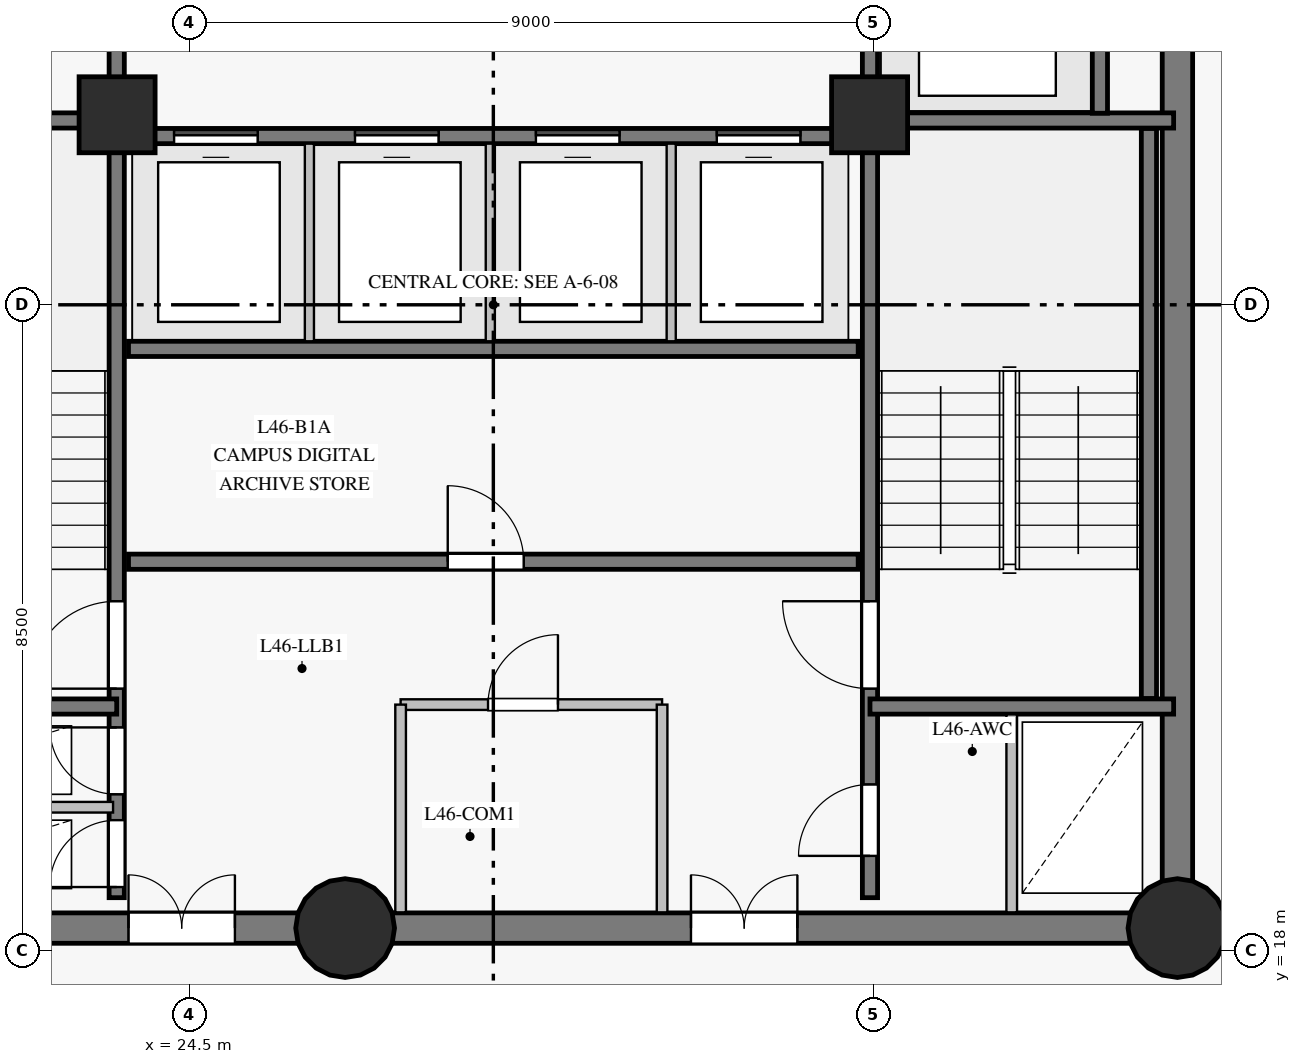
"""IFC4 building model, lengths in metres.
Left out: names, types, materials, properties, quantities, classifications, styles, units other than length and angle.
Written with IfcOpenShell. Run it as: python <this file> out.ifc"""

import sys

from ifc_helpers import new_model, si_unit, direction, frame, frame_2d, origin, origin_with_axes, origin_2d, place, context, subcontext, project, spatial, rectangle, circle, extrude, source, transform, mapped, element, fill, save


model = new_model("IFC4")
c1 = context("Model", 3, precision=1e-05, world=origin(), true_north=direction((0.0, 1.0)))
c2 = subcontext(c1, "Body", "Model", "MODEL_VIEW")
j1 = project(units=[si_unit("LENGTHUNIT", "METRE"), si_unit("PLANEANGLEUNIT", "RADIAN")], contexts=[c1])
p1 = place(None, origin())
s1 = spatial("IfcSite", under=j1, at=p1, CompositionType="ELEMENT")
p2 = place(p1, origin())
s2 = spatial("IfcBuilding", under=s1, at=p2, CompositionType="ELEMENT")
p3 = place(p2, frame((0.0, 0.0, 162.65)))
s3 = spatial("IfcBuildingStorey", under=s2, at=p3, CompositionType="ELEMENT", Elevation=162.65)
p4 = place(p3, frame((19.5, 18.3, 0.0), z_axis=(0.0, 0.0, 1.0), x_axis=(1.0, 0.0, 0.0)))
e1 = element("IfcWall", 1, at=p4, inside=s3, PredefinedType="SHEAR", context=c2, shape_type="SweptSolid", body=[
    extrude(rectangle(XDim=7.05, YDim=0.4, at=frame_2d((3.525, 0.0))), origin(), (0.0, 0.0, 1.0), 2.825),
])
p5 = place(p4, frame((4.2, 0.0, 0.0)))
e2 = element("IfcOpeningElement", 2, at=p5, cuts=e1, PredefinedType="OPENING", context=c2, shape_type="SweptSolid", body=[
    extrude(rectangle(XDim=1.4, YDim=2.2, at=frame_2d((0.7, 1.1))), frame((0.0, 0.21, 0.0), z_axis=(0.0, -1.0, 0.0), x_axis=(1.0, 0.0, 0.0)), (0.0, 0.0, 1.0), 0.42),
])
p6 = place(p3, frame((26.55, 18.3, 0.0), z_axis=(0.0, 0.0, 1.0), x_axis=(1.0, 0.0, 0.0)))
e3 = element("IfcWall", 3, at=p6, inside=s3, PredefinedType="SHEAR", context=c2, shape_type="SweptSolid", body=[
    extrude(rectangle(XDim=10.95, YDim=0.4, at=frame_2d((5.475, 0.0))), origin(), (0.0, 0.0, 1.0), 2.825),
])
p7 = place(p6, frame((4.55, 0.0, 0.0)))
e4 = element("IfcOpeningElement", 4, at=p7, cuts=e3, PredefinedType="OPENING", context=c2, shape_type="SweptSolid", body=[
    extrude(rectangle(XDim=1.4, YDim=2.2, at=frame_2d((0.7, 1.1))), frame((0.0, 0.21, 0.0), z_axis=(0.0, -1.0, 0.0), x_axis=(1.0, 0.0, 0.0)), (0.0, 0.0, 1.0), 0.42),
])
p8 = place(p3, frame((37.5, 18.3, 0.0), z_axis=(0.0, 0.0, 1.0), x_axis=(0.0, 1.0, 0.0)))
e5 = element("IfcWall", 5, at=p8, inside=s3, PredefinedType="SHEAR", context=c2, shape_type="SweptSolid", body=[
    extrude(rectangle(XDim=16.4, YDim=0.4, at=frame_2d((8.2, 0.0))), origin(), (0.0, 0.0, 1.0), 2.825),
])
p9 = place(p8, frame((14.15, 0.0, 0.0)))
e6 = element("IfcOpeningElement", 6, at=p9, cuts=e5, PredefinedType="OPENING", context=c2, shape_type="SweptSolid", body=[
    extrude(rectangle(XDim=1.2, YDim=2.15, at=frame_2d((0.6, 1.075))), frame((0.0, 0.21, 0.0), z_axis=(0.0, -1.0, 0.0), x_axis=(1.0, 0.0, 0.0)), (0.0, 0.0, 1.0), 0.42),
])
m1 = source(origin_with_axes(), c2, "Body", "SweptSolid", [
    extrude(circle(Radius=0.65, at=origin_2d()), origin(), (0.0, 0.0, 1.0), 3.05),
])
for number, where, z_axis, x_axis in (
    (7, (26.55, 18.3, 0.0), (0.0, 0.0, 1.0), (1.0, 0.0, 0.0)),
    (8, (37.5, 18.3, 0.0), (0.0, 0.0, 1.0), (1.0, 0.0, 0.0)),
):
    element("IfcColumn", number, at=place(p3, frame(where, z_axis=z_axis, x_axis=x_axis)), inside=s3, PredefinedType="COLUMN", context=c2, shape_type="MappedRepresentation", body=[
        mapped(m1, transform((0.0, 0.0, 0.0), scale=1.0)),
    ])
m2 = source(origin_with_axes(), c2, "Body", "SweptSolid", [
    extrude(rectangle(XDim=1.0, YDim=1.0, at=origin_2d()), origin(), (0.0, 0.0, 1.0), 3.05),
])
for number, where, z_axis, x_axis in (
    (9, (23.55, 29.0, 0.0), (0.0, 0.0, 1.0), (1.0, 0.0, 0.0)),
    (10, (33.45, 29.0, 0.0), (0.0, 0.0, 1.0), (1.0, 0.0, 0.0)),
):
    element("IfcColumn", number, at=place(p3, frame(where, z_axis=z_axis, x_axis=x_axis)), inside=s3, PredefinedType="COLUMN", context=c2, shape_type="MappedRepresentation", body=[
        mapped(m2, transform((0.0, 0.0, 0.0), scale=1.0)),
    ])
p10 = place(p3, frame((23.545, 18.7, 0.0), z_axis=(0.0, 0.0, 1.0), x_axis=(0.0, 1.0, 0.0)))
e11 = element("IfcWall", 11, at=p10, inside=s3, PredefinedType="SHEAR", context=c2, shape_type="SweptSolid", body=[
    extrude(rectangle(XDim=15.6, YDim=0.2, at=frame_2d((7.8, 0.0))), origin(), (0.0, 0.0, 1.0), 2.825),
])
p11 = place(p10, frame((2.75, 0.0, 0.0)))
e12 = element("IfcOpeningElement", 12, at=p11, cuts=e11, PredefinedType="OPENING", context=c2, shape_type="SweptSolid", body=[
    extrude(rectangle(XDim=1.15, YDim=2.15, at=frame_2d((0.575, 1.075))), frame((0.0, 0.11, 0.0), z_axis=(0.0, -1.0, 0.0), x_axis=(1.0, 0.0, 0.0)), (0.0, 0.0, 1.0), 0.22),
])
p12 = place(p10, frame((0.14, 0.0, 0.0)))
e13 = element("IfcOpeningElement", 13, at=p12, cuts=e11, PredefinedType="OPENING", context=c2, shape_type="SweptSolid", body=[
    extrude(rectangle(XDim=0.88, YDim=2.1, at=frame_2d((0.44, 1.05))), frame((0.0, 0.11, 0.0), z_axis=(0.0, -1.0, 0.0), x_axis=(1.0, 0.0, 0.0)), (0.0, 0.0, 1.0), 0.22),
])
p13 = place(p10, frame((1.36, 0.0, 0.0)))
e14 = element("IfcOpeningElement", 14, at=p13, cuts=e11, PredefinedType="OPENING", context=c2, shape_type="SweptSolid", body=[
    extrude(rectangle(XDim=0.88, YDim=2.1, at=frame_2d((0.44, 1.05))), frame((0.0, 0.11, 0.0), z_axis=(0.0, -1.0, 0.0), x_axis=(1.0, 0.0, 0.0)), (0.0, 0.0, 1.0), 0.22),
])
p14 = place(p10, frame((12.1, 0.0, 0.0)))
e15 = element("IfcOpeningElement", 15, at=p14, cuts=e11, PredefinedType="OPENING", context=c2, shape_type="SweptSolid", body=[
    extrude(rectangle(XDim=1.12, YDim=2.15, at=frame_2d((0.56, 1.075))), frame((0.0, 0.11, 0.0), z_axis=(0.0, -1.0, 0.0), x_axis=(1.0, 0.0, 0.0)), (0.0, 0.0, 1.0), 0.22),
])
p15 = place(p10, frame((14.05, 0.0, 0.0)))
e16 = element("IfcOpeningElement", 16, at=p15, cuts=e11, PredefinedType="OPENING", context=c2, shape_type="SweptSolid", body=[
    extrude(rectangle(XDim=1.12, YDim=2.15, at=frame_2d((0.56, 1.075))), frame((0.0, 0.11, 0.0), z_axis=(0.0, -1.0, 0.0), x_axis=(1.0, 0.0, 0.0)), (0.0, 0.0, 1.0), 0.22),
])
p16 = place(p3, frame((33.455, 18.7, 0.0), z_axis=(0.0, 0.0, 1.0), x_axis=(0.0, 1.0, 0.0)))
e17 = element("IfcWall", 17, at=p16, inside=s3, PredefinedType="SHEAR", context=c2, shape_type="SweptSolid", body=[
    extrude(rectangle(XDim=15.6, YDim=0.2, at=frame_2d((7.8, 0.0))), origin(), (0.0, 0.0, 1.0), 2.825),
])
p17 = place(p16, frame((2.75, 0.0, 0.0)))
e18 = element("IfcOpeningElement", 18, at=p17, cuts=e17, PredefinedType="OPENING", context=c2, shape_type="SweptSolid", body=[
    extrude(rectangle(XDim=1.15, YDim=2.15, at=frame_2d((0.575, 1.075))), frame((0.0, 0.11, 0.0), z_axis=(0.0, -1.0, 0.0), x_axis=(1.0, 0.0, 0.0)), (0.0, 0.0, 1.0), 0.22),
])
p18 = place(p16, frame((0.55, 0.0, 0.0)))
e19 = element("IfcOpeningElement", 19, at=p18, cuts=e17, PredefinedType="OPENING", context=c2, shape_type="SweptSolid", body=[
    extrude(rectangle(XDim=0.94, YDim=2.1, at=frame_2d((0.47, 1.05))), frame((0.0, 0.11, 0.0), z_axis=(0.0, -1.0, 0.0), x_axis=(1.0, 0.0, 0.0)), (0.0, 0.0, 1.0), 0.22),
])
p19 = place(p3, frame((23.7, 23.12, 0.0), z_axis=(0.0, 0.0, 1.0), x_axis=(1.0, 0.0, 0.0)))
e20 = element("IfcWall", 20, at=p19, inside=s3, PredefinedType="SHEAR", context=c2, shape_type="SweptSolid", body=[
    extrude(rectangle(XDim=9.6, YDim=0.2, at=frame_2d((4.8, 0.0))), origin(), (0.0, 0.0, 1.0), 2.825),
])
p20 = place(p19, frame((4.2, 0.0, 0.0)))
e21 = element("IfcOpeningElement", 21, at=p20, cuts=e20, PredefinedType="OPENING", context=c2, shape_type="SweptSolid", body=[
    extrude(rectangle(XDim=1.0, YDim=2.15, at=frame_2d((0.5, 1.075))), frame((0.0, 0.11, 0.0), z_axis=(0.0, -1.0, 0.0), x_axis=(1.0, 0.0, 0.0)), (0.0, 0.0, 1.0), 0.22),
])
p21 = place(p3, frame((23.7, 25.92, 0.0), z_axis=(0.0, 0.0, 1.0), x_axis=(1.0, 0.0, 0.0)))
e22 = element("IfcWall", 22, at=p21, inside=s3, PredefinedType="SHEAR", context=c2, shape_type="SweptSolid", body=[
    extrude(rectangle(XDim=9.6, YDim=0.2, at=frame_2d((4.8, 0.0))), origin(), (0.0, 0.0, 1.0), 2.825),
])
p22 = place(p3, frame((23.7, 28.72, 0.0), z_axis=(0.0, 0.0, 1.0), x_axis=(1.0, 0.0, 0.0)))
e23 = element("IfcWall", 23, at=p22, inside=s3, PredefinedType="SHEAR", context=c2, shape_type="SweptSolid", body=[
    extrude(rectangle(XDim=9.6, YDim=0.2, at=frame_2d((4.8, 0.0))), origin(), (0.0, 0.0, 1.0), 2.825),
])
p23 = place(p22, frame((0.6, 0.0, 0.0)))
e24 = element("IfcOpeningElement", 24, at=p23, cuts=e23, PredefinedType="OPENING", context=c2, shape_type="SweptSolid", body=[
    extrude(rectangle(XDim=1.1, YDim=2.15, at=frame_2d((0.55, 1.075))), frame((0.0, 0.11, 0.0), z_axis=(0.0, -1.0, 0.0), x_axis=(1.0, 0.0, 0.0)), (0.0, 0.0, 1.0), 0.22),
])
p24 = place(p22, frame((2.98, 0.0, 0.0)))
e25 = element("IfcOpeningElement", 25, at=p24, cuts=e23, PredefinedType="OPENING", context=c2, shape_type="SweptSolid", body=[
    extrude(rectangle(XDim=1.1, YDim=2.15, at=frame_2d((0.55, 1.075))), frame((0.0, 0.11, 0.0), z_axis=(0.0, -1.0, 0.0), x_axis=(1.0, 0.0, 0.0)), (0.0, 0.0, 1.0), 0.22),
])
p25 = place(p22, frame((5.36, 0.0, 0.0)))
e26 = element("IfcOpeningElement", 26, at=p25, cuts=e23, PredefinedType="OPENING", context=c2, shape_type="SweptSolid", body=[
    extrude(rectangle(XDim=1.1, YDim=2.15, at=frame_2d((0.55, 1.075))), frame((0.0, 0.11, 0.0), z_axis=(0.0, -1.0, 0.0), x_axis=(1.0, 0.0, 0.0)), (0.0, 0.0, 1.0), 0.22),
])
p26 = place(p22, frame((7.74, 0.0, 0.0)))
e27 = element("IfcOpeningElement", 27, at=p26, cuts=e23, PredefinedType="OPENING", context=c2, shape_type="SweptSolid", body=[
    extrude(rectangle(XDim=1.1, YDim=2.15, at=frame_2d((0.55, 1.075))), frame((0.0, 0.11, 0.0), z_axis=(0.0, -1.0, 0.0), x_axis=(1.0, 0.0, 0.0)), (0.0, 0.0, 1.0), 0.22),
])
p27 = place(p3, frame((37.125, 21.32, 0.0), z_axis=(0.0, 0.0, 1.0), x_axis=(0.0, 1.0, 0.0)))
e28 = element("IfcWall", 28, at=p27, inside=s3, PredefinedType="SHEAR", context=c2, shape_type="SweptSolid", body=[
    extrude(rectangle(XDim=7.5, YDim=0.2, at=frame_2d((3.75, 0.0))), origin(), (0.0, 0.0, 1.0), 2.825),
])
for number, where, z_axis, x_axis in (
    (29, (33.455, 21.215, 0.0), (0.0, 0.0, 1.0), (1.0, 0.0, 0.0)),
    (30, (33.455, 28.925, 0.0), (0.0, 0.0, 1.0), (1.0, 0.0, 0.0)),
    (31, (19.55, 21.215, 0.0), (0.0, 0.0, 1.0), (1.0, 0.0, 0.0)),
    (32, (19.55, 28.925, 0.0), (0.0, 0.0, 1.0), (1.0, 0.0, 0.0)),
):
    element("IfcWall", number, at=place(p3, frame(where, z_axis=z_axis, x_axis=x_axis)), inside=s3, PredefinedType="SHEAR", context=c2, shape_type="SweptSolid", body=[
        extrude(rectangle(XDim=3.995, YDim=0.2, at=frame_2d((1.998, 0.0))), origin(), (0.0, 0.0, 1.0), 2.825),
    ])
p28 = place(p3, frame((36.48, 29.02, 0.0), z_axis=(0.0, 0.0, 1.0), x_axis=(0.0, 1.0, 0.0)))
e33 = element("IfcWall", 33, at=p28, inside=s3, PredefinedType="SHEAR", context=c2, shape_type="SweptSolid", body=[
    extrude(rectangle(XDim=2.86, YDim=0.2, at=frame_2d((1.43, 0.0))), origin(), (0.0, 0.0, 1.0), 2.825),
])
p29 = place(p3, frame((19.707, 19.89, 0.0), z_axis=(0.0, 0.0, 1.0), x_axis=(1.0, 0.0, 0.0)))
e34 = element("IfcWall", 34, at=p29, inside=s3, PredefinedType="PARTITIONING", context=c2, shape_type="SweptSolid", body=[
    extrude(rectangle(XDim=3.79, YDim=0.14, at=frame_2d((1.895, 0.0))), origin(), (0.0, 0.0, 1.0), 2.825),
])
p30 = place(p3, frame((27.28, 21.24, 0.0), z_axis=(0.0, 0.0, 1.0), x_axis=(1.0, 0.0, 0.0)))
e35 = element("IfcWall", 35, at=p30, inside=s3, PredefinedType="PARTITIONING", context=c2, shape_type="SweptSolid", body=[
    extrude(rectangle(XDim=3.44, YDim=0.14, at=frame_2d((1.72, 0.0))), origin(), (0.0, 0.0, 1.0), 2.825),
])
p31 = place(p30, frame((1.15, 0.0, 0.0)))
e36 = element("IfcOpeningElement", 36, at=p31, cuts=e35, PredefinedType="OPENING", context=c2, shape_type="SweptSolid", body=[
    extrude(rectangle(XDim=0.92, YDim=2.1, at=frame_2d((0.46, 1.05))), frame((0.0, 0.08, 0.0), z_axis=(0.0, -1.0, 0.0), x_axis=(1.0, 0.0, 0.0)), (0.0, 0.0, 1.0), 0.16),
])
for number, where, z_axis, x_axis in (
    (37, (27.28, 18.507, 0.0), (0.0, 0.0, 1.0), (0.0, 1.0, 0.0)),
    (38, (30.72, 18.507, 0.0), (0.0, 0.0, 1.0), (0.0, 1.0, 0.0)),
):
    element("IfcWall", number, at=place(p3, frame(where, z_axis=z_axis, x_axis=x_axis)), inside=s3, PredefinedType="PARTITIONING", context=c2, shape_type="SweptSolid", body=[
        extrude(rectangle(XDim=2.733, YDim=0.14, at=frame_2d((1.366, 0.0))), origin(), (0.0, 0.0, 1.0), 2.825),
    ])
for number, where, z_axis, x_axis in (
    (39, (26.08, 26.02, 0.0), (0.0, 0.0, 1.0), (0.0, 1.0, 0.0)),
    (40, (28.46, 26.02, 0.0), (0.0, 0.0, 1.0), (0.0, 1.0, 0.0)),
    (41, (30.84, 26.02, 0.0), (0.0, 0.0, 1.0), (0.0, 1.0, 0.0)),
):
    element("IfcWall", number, at=place(p3, frame(where, z_axis=z_axis, x_axis=x_axis)), inside=s3, PredefinedType="PARTITIONING", context=c2, shape_type="SweptSolid", body=[
        extrude(rectangle(XDim=2.6, YDim=0.12, at=frame_2d((1.3, 0.0))), origin(), (0.0, 0.0, 1.0), 2.825),
    ])
p32 = place(p3, frame((35.32, 18.507, 0.0), z_axis=(0.0, 0.0, 1.0), x_axis=(0.0, 1.0, 0.0)))
e42 = element("IfcWall", 42, at=p32, inside=s3, PredefinedType="PARTITIONING", context=c2, shape_type="SweptSolid", body=[
    extrude(rectangle(XDim=2.604, YDim=0.14, at=frame_2d((1.302, 0.0))), origin(), (0.0, 0.0, 1.0), 2.825),
])
m3 = source(origin_with_axes(), c2, "Body", "SweptSolid", [
    extrude(rectangle(XDim=1.15, YDim=2.15, at=frame_2d((0.575, 1.075))), frame((0.0, 0.025, 0.0), z_axis=(0.0, -1.0, 0.0), x_axis=(1.0, 0.0, 0.0)), (0.0, 0.0, 1.0), 0.05),
])
p33 = place(p11, origin())
e43 = element("IfcDoor", 43, at=p33, inside=s3, OperationType="SINGLE_SWING_LEFT", PredefinedType="DOOR", context=c2, shape_type="MappedRepresentation", body=[
    mapped(m3, transform((0.0, 0.0, 0.0), scale=1.0)),
])
fill(e12, e43)
p34 = place(p17, origin())
e44 = element("IfcDoor", 44, at=p34, inside=s3, OperationType="SINGLE_SWING_RIGHT", PredefinedType="DOOR", context=c2, shape_type="MappedRepresentation", body=[
    mapped(m3, transform((0.0, 0.0, 0.0), scale=1.0)),
])
fill(e18, e44)
m4 = source(origin_with_axes(), c2, "Body", "SweptSolid", [
    extrude(rectangle(XDim=0.88, YDim=2.1, at=frame_2d((0.44, 1.05))), frame((0.0, 0.025, 0.0), z_axis=(0.0, -1.0, 0.0), x_axis=(1.0, 0.0, 0.0)), (0.0, 0.0, 1.0), 0.05),
])
p35 = place(p12, origin())
e45 = element("IfcDoor", 45, at=p35, inside=s3, OperationType="SINGLE_SWING_LEFT", PredefinedType="DOOR", context=c2, shape_type="MappedRepresentation", body=[
    mapped(m4, transform((0.0, 0.0, 0.0), scale=1.0)),
])
fill(e13, e45)
p36 = place(p13, origin())
e46 = element("IfcDoor", 46, at=p36, inside=s3, OperationType="SINGLE_SWING_RIGHT", PredefinedType="DOOR", context=c2, shape_type="MappedRepresentation", body=[
    mapped(m4, transform((0.0, 0.0, 0.0), scale=1.0)),
])
fill(e14, e46)
m5 = source(origin_with_axes(), c2, "Body", "SweptSolid", [
    extrude(rectangle(XDim=1.4, YDim=2.2, at=frame_2d((0.7, 1.1))), frame((0.0, 0.025, 0.0), z_axis=(0.0, -1.0, 0.0), x_axis=(1.0, 0.0, 0.0)), (0.0, 0.0, 1.0), 0.05),
])
p37 = place(p5, origin())
e47 = element("IfcDoor", 47, at=p37, inside=s3, OperationType="DOUBLE_DOOR_SINGLE_SWING", PredefinedType="DOOR", context=c2, shape_type="MappedRepresentation", body=[
    mapped(m5, transform((0.0, 0.0, 0.0), scale=1.0)),
])
fill(e2, e47)
p38 = place(p7, origin())
e48 = element("IfcDoor", 48, at=p38, inside=s3, OperationType="DOUBLE_DOOR_SINGLE_SWING", PredefinedType="DOOR", context=c2, shape_type="MappedRepresentation", body=[
    mapped(m5, transform((0.0, 0.0, 0.0), scale=1.0)),
])
fill(e4, e48)
m6 = source(origin_with_axes(), c2, "Body", "SweptSolid", [
    extrude(rectangle(XDim=0.94, YDim=2.1, at=frame_2d((0.47, 1.05))), frame((0.0, 0.025, 0.0), z_axis=(0.0, -1.0, 0.0), x_axis=(1.0, 0.0, 0.0)), (0.0, 0.0, 1.0), 0.05),
])
p39 = place(p18, origin())
e49 = element("IfcDoor", 49, at=p39, inside=s3, OperationType="SINGLE_SWING_LEFT", PredefinedType="DOOR", context=c2, shape_type="MappedRepresentation", body=[
    mapped(m6, transform((0.0, 0.0, 0.0), scale=1.0)),
])
fill(e19, e49)
m7 = source(origin_with_axes(), c2, "Body", "SweptSolid", [
    extrude(rectangle(XDim=0.92, YDim=2.1, at=frame_2d((0.46, 1.05))), frame((0.0, 0.025, 0.0), z_axis=(0.0, -1.0, 0.0), x_axis=(1.0, 0.0, 0.0)), (0.0, 0.0, 1.0), 0.05),
])
p40 = place(p31, origin())
e50 = element("IfcDoor", 50, at=p40, inside=s3, OperationType="SINGLE_SWING_RIGHT", PredefinedType="DOOR", context=c2, shape_type="MappedRepresentation", body=[
    mapped(m7, transform((0.0, 0.0, 0.0), scale=1.0)),
])
fill(e36, e50)
m8 = source(origin_with_axes(), c2, "Body", "SweptSolid", [
    extrude(rectangle(XDim=1.0, YDim=2.15, at=frame_2d((0.5, 1.075))), frame((0.0, 0.025, 0.0), z_axis=(0.0, -1.0, 0.0), x_axis=(1.0, 0.0, 0.0)), (0.0, 0.0, 1.0), 0.05),
])
p41 = place(p20, origin())
e51 = element("IfcDoor", 51, at=p41, inside=s3, OperationType="SINGLE_SWING_LEFT", PredefinedType="DOOR", context=c2, shape_type="MappedRepresentation", body=[
    mapped(m8, transform((0.0, 0.0, 0.0), scale=1.0)),
])
fill(e21, e51)
m9 = source(origin_with_axes(), c2, "Body", "SweptSolid", [
    extrude(rectangle(XDim=1.1, YDim=2.15, at=frame_2d((0.55, 1.075))), frame((0.0, 0.025, 0.0), z_axis=(0.0, -1.0, 0.0), x_axis=(1.0, 0.0, 0.0)), (0.0, 0.0, 1.0), 0.05),
])
p42 = place(p23, origin())
e52 = element("IfcDoor", 52, at=p42, inside=s3, OperationType="SLIDING_TO_LEFT", PredefinedType="DOOR", context=c2, shape_type="MappedRepresentation", body=[
    mapped(m9, transform((0.0, 0.0, 0.0), scale=1.0)),
])
fill(e24, e52)
p43 = place(p24, origin())
e53 = element("IfcDoor", 53, at=p43, inside=s3, OperationType="SLIDING_TO_RIGHT", PredefinedType="DOOR", context=c2, shape_type="MappedRepresentation", body=[
    mapped(m9, transform((0.0, 0.0, 0.0), scale=1.0)),
])
fill(e25, e53)
p44 = place(p25, origin())
e54 = element("IfcDoor", 54, at=p44, inside=s3, OperationType="SLIDING_TO_LEFT", PredefinedType="DOOR", context=c2, shape_type="MappedRepresentation", body=[
    mapped(m9, transform((0.0, 0.0, 0.0), scale=1.0)),
])
fill(e26, e54)
p45 = place(p26, origin())
e55 = element("IfcDoor", 55, at=p45, inside=s3, OperationType="SLIDING_TO_RIGHT", PredefinedType="DOOR", context=c2, shape_type="MappedRepresentation", body=[
    mapped(m9, transform((0.0, 0.0, 0.0), scale=1.0)),
])
fill(e27, e55)
save(model, sys.argv[1])
